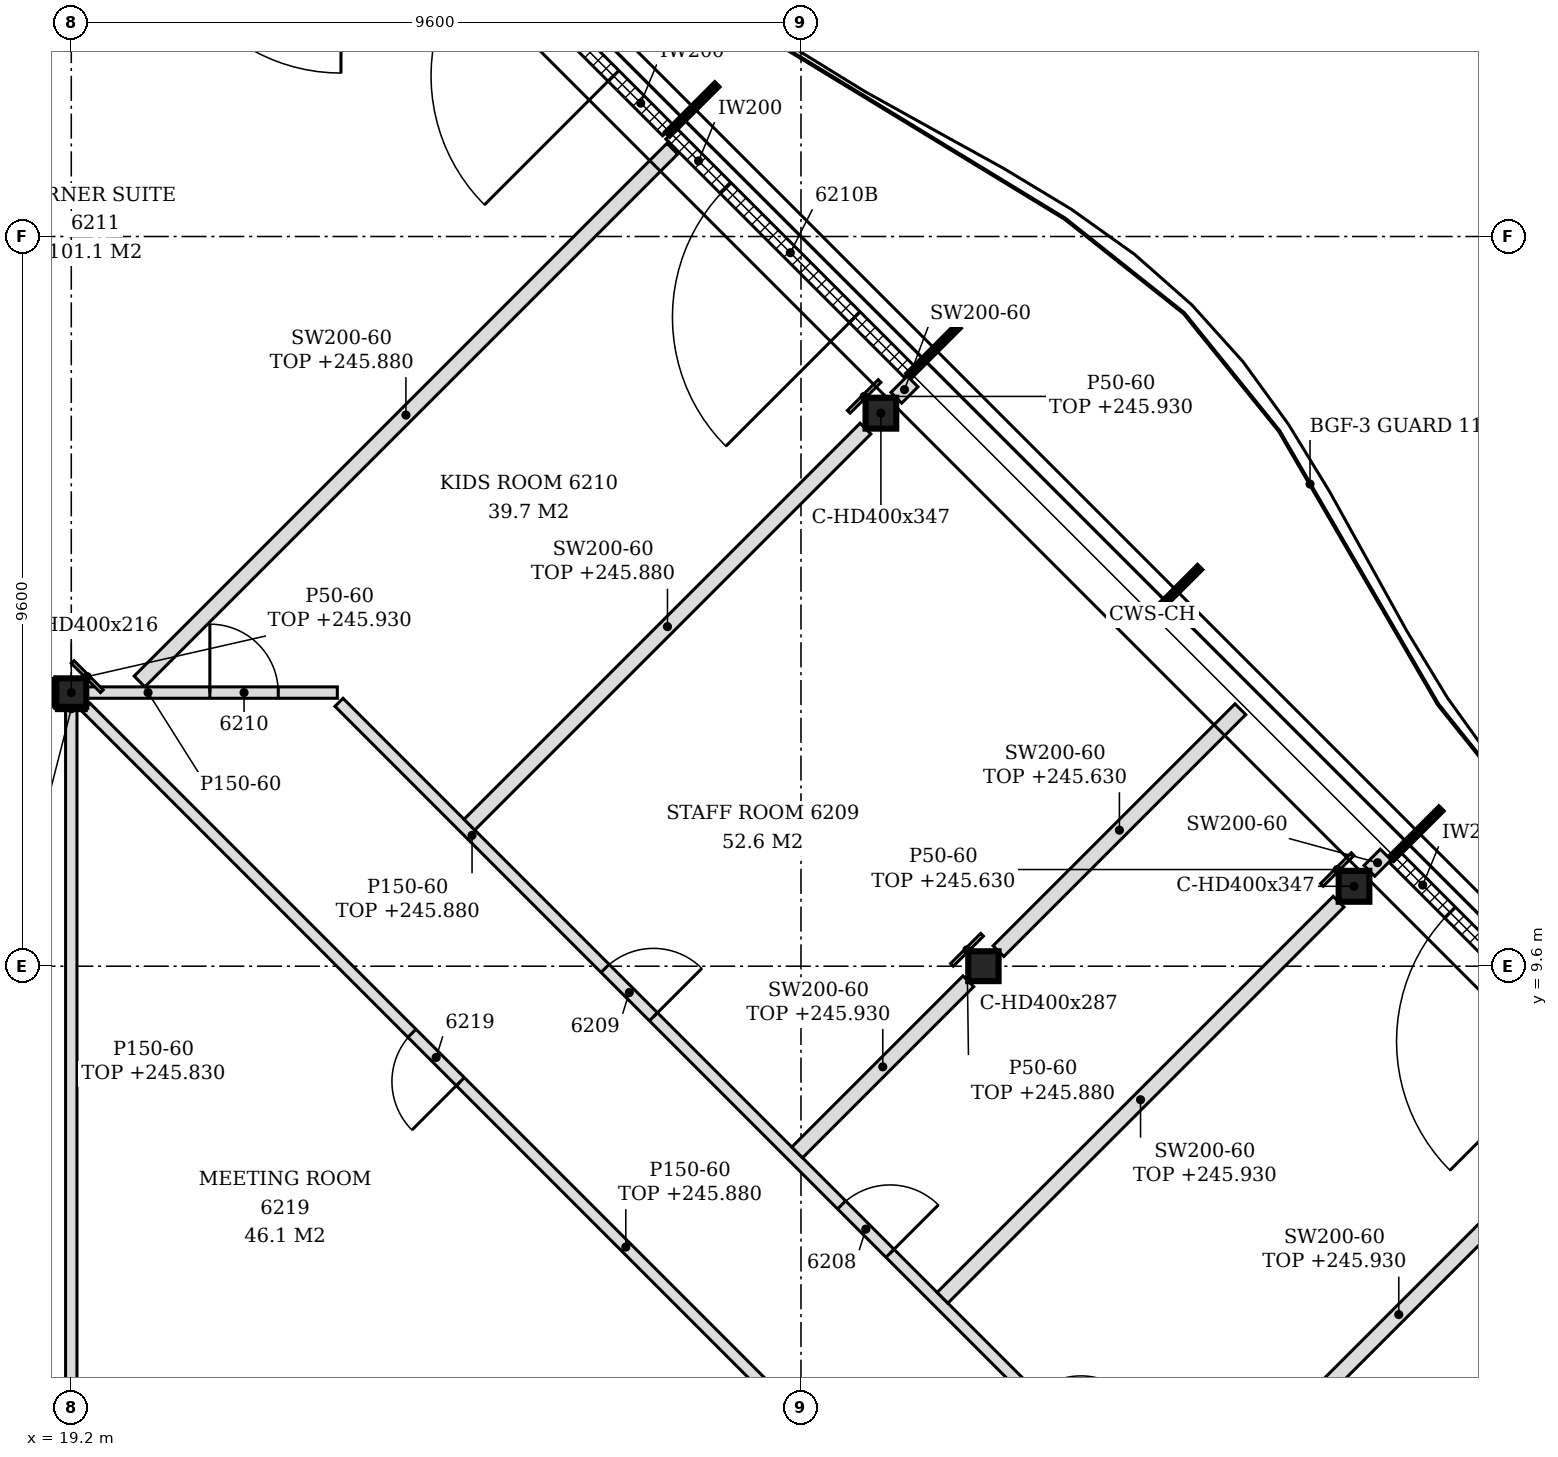
"""IFC4 building model, lengths in metres.
Left out: names, types, materials, properties, quantities, classifications, styles, units other than length and angle.
Written with IfcOpenShell. Run it as: python <this file> out.ifc"""

import sys

from ifc_helpers import new_model, si_unit, direction, frame, frame_2d, origin, origin_2d, place, context, subcontext, project, spatial, rectangle, i_section, extrude, element, fill, save


model = new_model("IFC4")
c1 = context("Model", 3, precision=1e-05, world=origin(), true_north=direction((0.0, 1.0)))
c2 = subcontext(c1, "Body", "Model", "MODEL_VIEW")
j1 = project(units=[si_unit("LENGTHUNIT", "METRE"), si_unit("PLANEANGLEUNIT", "RADIAN")], contexts=[c1])
p1 = place(None, origin())
s1 = spatial("IfcSite", under=j1, at=p1, CompositionType="ELEMENT")
p2 = place(p1, origin())
s2 = spatial("IfcBuilding", under=s1, at=p2, CompositionType="ELEMENT")
p3 = place(p2, frame((0.0, 0.0, 243.0)))
s3 = spatial("IfcBuildingStorey", under=s2, at=p3, CompositionType="ELEMENT", Elevation=243.0)
for number, where, z_axis, x_axis in (
    (1, (36.076, 10.652, -0.15), (0.0, 0.0, 1.0), (1.0, 0.0, 0.0)),
    (2, (29.852, 16.876, -0.15), (0.0, 0.0, 1.0), (1.0, 0.0, 0.0)),
):
    element("IfcColumn", number, at=place(p3, frame(where, z_axis=z_axis, x_axis=x_axis)), inside=s3, PredefinedType="COLUMN", context=c2, shape_type="SweptSolid", body=[
        extrude(i_section(OverallWidth=0.404, OverallDepth=0.407, WebThickness=0.027, FlangeThickness=0.044, FilletRadius=0.015, at=origin_2d()), origin(), (0.0, 0.0, 1.0), 3.6),
    ])
p4 = place(p3, frame((19.2, 13.2, -0.15), z_axis=(0.0, 0.0, 1.0), x_axis=(1.0, 0.0, 0.0)))
e3 = element("IfcColumn", 3, at=p4, inside=s3, PredefinedType="COLUMN", context=c2, shape_type="SweptSolid", body=[
    extrude(i_section(OverallWidth=0.394, OverallDepth=0.375, WebThickness=0.017, FlangeThickness=0.028, FilletRadius=0.015, at=origin_2d()), origin(), (0.0, 0.0, 1.0), 3.6),
])
p5 = place(p3, frame((31.2, 9.6, -0.15), z_axis=(0.0, 0.0, 1.0), x_axis=(1.0, 0.0, 0.0)))
e4 = element("IfcColumn", 4, at=p5, inside=s3, PredefinedType="COLUMN", context=c2, shape_type="SweptSolid", body=[
    extrude(i_section(OverallWidth=0.399, OverallDepth=0.393, WebThickness=0.023, FlangeThickness=0.037, FilletRadius=0.015, at=origin_2d()), origin(), (0.0, 0.0, 1.0), 3.6),
])
p6 = place(p3, frame((39.753, 7.893, 0.0), z_axis=(0.0, 0.0, 1.0), x_axis=(-0.707106781187, 0.707106781187, 0.0)))
e5 = element("IfcWall", 5, at=p6, inside=s3, PredefinedType="NOTDEFINED", context=c2, shape_type="SweptSolid", body=[
    extrude(rectangle(XDim=4.431, YDim=0.2, at=frame_2d((2.215, 0.0))), origin(), (0.0, 0.0, 1.0), 3.45),
])
p7 = place(p6, frame((1.015, 0.0, 0.0)))
e6 = element("IfcOpeningElement", 6, at=p7, cuts=e5, PredefinedType="OPENING", context=c2, shape_type="SweptSolid", body=[
    extrude(rectangle(XDim=2.4, YDim=2.4, at=frame_2d((1.2, 1.2))), frame((0.0, 0.11, 0.0), z_axis=(0.0, -1.0, 0.0), x_axis=(1.0, 0.0, 0.0)), (0.0, 0.0, 1.0), 0.22),
])
p8 = place(p3, frame((30.226, 17.42, 0.0), z_axis=(0.0, 0.0, 1.0), x_axis=(-0.707079231393, 0.707134329907, 0.0)))
e7 = element("IfcWall", 7, at=p8, inside=s3, PredefinedType="NOTDEFINED", context=c2, shape_type="SweptSolid", body=[
    extrude(rectangle(XDim=4.431, YDim=0.2, at=frame_2d((2.215, 0.0))), origin(), (0.0, 0.0, 1.0), 3.45),
])
p9 = place(p8, frame((1.015, 0.0, 0.0)))
e8 = element("IfcOpeningElement", 8, at=p9, cuts=e7, PredefinedType="OPENING", context=c2, shape_type="SweptSolid", body=[
    extrude(rectangle(XDim=2.4, YDim=2.4, at=frame_2d((1.2, 1.2))), frame((0.0, 0.11, 0.0), z_axis=(0.0, -1.0, 0.0), x_axis=(1.0, 0.0, 0.0)), (0.0, 0.0, 1.0), 0.22),
])
p10 = place(p3, frame((27.051, 20.596, 0.0), z_axis=(0.0, 0.0, 1.0), x_axis=(-0.707106781187, 0.707106781187, 0.0)))
e9 = element("IfcWall", 9, at=p10, inside=s3, PredefinedType="NOTDEFINED", context=c2, shape_type="SweptSolid", body=[
    extrude(rectangle(XDim=4.421, YDim=0.2, at=frame_2d((2.21, 0.0))), origin(), (0.0, 0.0, 1.0), 3.45),
])
p11 = place(p10, frame((1.016, 0.0, 0.0)))
e10 = element("IfcOpeningElement", 10, at=p11, cuts=e9, PredefinedType="OPENING", context=c2, shape_type="SweptSolid", body=[
    extrude(rectangle(XDim=2.4, YDim=2.4, at=frame_2d((1.2, 1.2))), frame((0.0, 0.11, 0.0), z_axis=(0.0, -1.0, 0.0), x_axis=(1.0, 0.0, 0.0)), (0.0, 0.0, 1.0), 0.22),
])
p12 = place(p3, frame((34.8, 0.994, 0.0), z_axis=(0.0, 0.0, 1.0), x_axis=(-0.707099634543, 0.707113927758, 0.0)))
e11 = element("IfcWall", 11, at=p12, inside=s3, PredefinedType="PARTITIONING", context=c2, shape_type="SweptSolid", body=[
    extrude(rectangle(XDim=17.081, YDim=0.15, at=frame_2d((8.541, 0.0))), origin(), (0.0, 0.0, 1.0), 2.88),
])
p13 = place(p12, frame((3.276, 0.0, 0.0)))
e12 = element("IfcOpeningElement", 12, at=p13, cuts=e11, PredefinedType="OPENING", context=c2, shape_type="SweptSolid", body=[
    extrude(rectangle(XDim=0.9, YDim=2.1, at=frame_2d((0.45, 1.05))), frame((0.0, 0.085, 0.0), z_axis=(0.0, -1.0, 0.0), x_axis=(1.0, 0.0, 0.0)), (0.0, 0.0, 1.0), 0.17),
])
p14 = place(p12, frame((6.829, 0.0, 0.0)))
e13 = element("IfcOpeningElement", 13, at=p14, cuts=e11, PredefinedType="OPENING", context=c2, shape_type="SweptSolid", body=[
    extrude(rectangle(XDim=0.9, YDim=2.1, at=frame_2d((0.45, 1.05))), frame((0.0, 0.085, 0.0), z_axis=(0.0, -1.0, 0.0), x_axis=(1.0, 0.0, 0.0)), (0.0, 0.0, 1.0), 0.17),
])
p15 = place(p12, frame((11.23, 0.0, 0.0)))
e14 = element("IfcOpeningElement", 14, at=p15, cuts=e11, PredefinedType="OPENING", context=c2, shape_type="SweptSolid", body=[
    extrude(rectangle(XDim=0.9, YDim=2.1, at=frame_2d((0.45, 1.05))), frame((0.0, 0.085, 0.0), z_axis=(0.0, -1.0, 0.0), x_axis=(1.0, 0.0, 0.0)), (0.0, 0.0, 1.0), 0.17),
])
p16 = place(p3, frame((33.774, 2.126, 0.0), z_axis=(0.0, 0.0, 1.0), x_axis=(0.707121711178, 0.70709185088, 0.0)))
e15 = element("IfcWall", 15, at=p16, inside=s3, PredefinedType="PARTITIONING", context=c2, shape_type="SweptSolid", body=[
    extrude(rectangle(XDim=8.176, YDim=0.2, at=frame_2d((4.088, 0.0))), origin(), (0.0, 0.0, 1.0), 2.93),
])
p17 = place(p3, frame((19.2, 3.675, 0.0), z_axis=(0.0, 0.0, 1.0), x_axis=(0.0, 1.0, 0.0)))
e16 = element("IfcWall", 16, at=p17, inside=s3, PredefinedType="PARTITIONING", context=c2, shape_type="SweptSolid", body=[
    extrude(rectangle(XDim=9.337, YDim=0.15, at=frame_2d((4.669, 0.0))), origin(), (0.0, 0.0, 1.0), 2.83),
])
p18 = place(p3, frame((28.672, 3.728, 0.0), z_axis=(0.0, 0.0, 1.0), x_axis=(-0.707106781187, 0.707106781187, 0.0)))
e17 = element("IfcWall", 17, at=p18, inside=s3, PredefinedType="PARTITIONING", context=c2, shape_type="SweptSolid", body=[
    extrude(rectangle(XDim=13.124, YDim=0.15, at=frame_2d((6.562, 0.0))), origin(), (0.0, 0.0, 1.0), 2.88),
])
p19 = place(p18, frame((6.157, 0.0, 0.0)))
e18 = element("IfcOpeningElement", 18, at=p19, cuts=e17, PredefinedType="OPENING", context=c2, shape_type="SweptSolid", body=[
    extrude(rectangle(XDim=0.9, YDim=2.1, at=frame_2d((0.45, 1.05))), frame((0.0, 0.085, 0.0), z_axis=(0.0, -1.0, 0.0), x_axis=(1.0, 0.0, 0.0)), (0.0, 0.0, 1.0), 0.17),
])
p20 = place(p3, frame((30.662, 5.238, 0.0), z_axis=(0.0, 0.0, 1.0), x_axis=(0.707106781187, 0.707106781187, 0.0)))
e19 = element("IfcWall", 19, at=p20, inside=s3, PredefinedType="PARTITIONING", context=c2, shape_type="SweptSolid", body=[
    extrude(rectangle(XDim=7.369, YDim=0.2, at=frame_2d((3.685, 0.0))), origin(), (0.0, 0.0, 1.0), 2.93),
])
p21 = place(p3, frame((28.75, 7.15, 0.0), z_axis=(0.0, 0.0, 1.0), x_axis=(0.7070684525, 0.707145107796, 0.0)))
e20 = element("IfcWall", 20, at=p21, inside=s3, PredefinedType="PARTITIONING", context=c2, shape_type="SweptSolid", body=[
    extrude(rectangle(XDim=3.185, YDim=0.2, at=frame_2d((1.592, 0.0))), origin(), (0.0, 0.0, 1.0), 2.93),
])
p22 = place(p3, frame((31.398, 9.798, 0.0), z_axis=(0.0, 0.0, 1.0), x_axis=(0.707133900936, 0.707079660397, 0.0)))
e21 = element("IfcWall", 21, at=p22, inside=s3, PredefinedType="PARTITIONING", context=c2, shape_type="SweptSolid", body=[
    extrude(rectangle(XDim=4.501, YDim=0.2, at=frame_2d((2.25, 0.0))), origin(), (0.0, 0.0, 1.0), 2.63),
])
p23 = place(p3, frame((36.278, 10.854, 0.0), z_axis=(0.0, 0.0, 1.0), x_axis=(0.707509117806, 0.706704215511, 0.0)))
e22 = element("IfcWall", 22, at=p23, inside=s3, PredefinedType="PARTITIONING", context=c2, shape_type="SweptSolid", body=[
    extrude(rectangle(XDim=0.303, YDim=0.2, at=frame_2d((0.152, 0.0))), origin(), (0.0, 0.0, 1.0), 3.45),
])
p24 = place(p3, frame((24.438, 11.462, 0.0), z_axis=(0.0, 0.0, 1.0), x_axis=(0.707090216072, 0.707123345913, 0.0)))
e23 = element("IfcWall", 23, at=p24, inside=s3, PredefinedType="PARTITIONING", context=c2, shape_type="SweptSolid", body=[
    extrude(rectangle(XDim=7.369, YDim=0.2, at=frame_2d((3.685, 0.0))), origin(), (0.0, 0.0, 1.0), 2.88),
])
p25 = place(p3, frame((7.397, 13.2, 0.0), z_axis=(0.0, 0.0, 1.0), x_axis=(1.0, 0.0, 0.0)))
e24 = element("IfcWall", 24, at=p25, inside=s3, PredefinedType="PARTITIONING", context=c2, shape_type="SweptSolid", body=[
    extrude(rectangle(XDim=11.606, YDim=0.15, at=frame_2d((5.803, 0.0))), origin(), (0.0, 0.0, 1.0), 2.83),
])
p26 = place(p25, frame((10.153, 0.0, 0.0)))
e25 = element("IfcOpeningElement", 25, at=p26, cuts=e24, PredefinedType="OPENING", context=c2, shape_type="SweptSolid", body=[
    extrude(rectangle(XDim=0.9, YDim=2.1, at=frame_2d((0.45, 1.05))), frame((0.0, 0.085, 0.0), z_axis=(0.0, -1.0, 0.0), x_axis=(1.0, 0.0, 0.0)), (0.0, 0.0, 1.0), 0.17),
])
p27 = place(p3, frame((19.397, 13.2, 0.0), z_axis=(0.0, 0.0, 1.0), x_axis=(1.0, 0.0, 0.0)))
e26 = element("IfcWall", 26, at=p27, inside=s3, PredefinedType="PARTITIONING", context=c2, shape_type="SweptSolid", body=[
    extrude(rectangle(XDim=3.303, YDim=0.15, at=frame_2d((1.652, 0.0))), origin(), (0.0, 0.0, 1.0), 3.45),
])
p28 = place(p27, frame((1.626, 0.0, 0.0)))
e27 = element("IfcOpeningElement", 27, at=p28, cuts=e26, PredefinedType="OPENING", context=c2, shape_type="SweptSolid", body=[
    extrude(rectangle(XDim=0.9, YDim=2.1, at=frame_2d((0.45, 1.05))), frame((0.0, 0.085, 0.0), z_axis=(0.0, -1.0, 0.0), x_axis=(1.0, 0.0, 0.0)), (0.0, 0.0, 1.0), 0.17),
])
p29 = place(p3, frame((20.098, 13.346, 0.0), z_axis=(0.0, 0.0, 1.0), x_axis=(0.707119095079, 0.70709446708, 0.0)))
e28 = element("IfcWall", 28, at=p29, inside=s3, PredefinedType="PARTITIONING", context=c2, shape_type="SweptSolid", body=[
    extrude(rectangle(XDim=9.913, YDim=0.2, at=frame_2d((4.957, 0.0))), origin(), (0.0, 0.0, 1.0), 2.88),
])
p30 = place(p3, frame((30.054, 17.078, 0.0), z_axis=(0.0, 0.0, 1.0), x_axis=(0.707106781187, 0.707106781187, 0.0)))
e29 = element("IfcWall", 29, at=p30, inside=s3, PredefinedType="PARTITIONING", context=c2, shape_type="SweptSolid", body=[
    extrude(rectangle(XDim=0.303, YDim=0.2, at=frame_2d((0.152, 0.0))), origin(), (0.0, 0.0, 1.0), 3.45),
])
p31 = place(p3, frame((18.978, 13.012, 0.0), z_axis=(0.0, 0.0, 1.0), x_axis=(0.0, 1.0, 0.0)))
e30 = element("IfcWall", 30, at=p31, inside=s3, PredefinedType="PARTITIONING", context=c2, shape_type="SweptSolid", body=[
    extrude(rectangle(XDim=0.375, YDim=0.05, at=frame_2d((0.188, 0.0))), origin(), (0.0, 0.0, 1.0), 2.83),
])
p32 = place(p3, frame((19.602, 13.218, 0.0), z_axis=(0.0, 0.0, 1.0), x_axis=(-0.707106781187, 0.707106781187, 0.0)))
e31 = element("IfcWall", 31, at=p32, inside=s3, PredefinedType="PARTITIONING", context=c2, shape_type="SweptSolid", body=[
    extrude(rectangle(XDim=0.544, YDim=0.05, at=frame_2d((0.272, 0.0))), origin(), (0.0, 0.0, 1.0), 2.93),
])
p33 = place(p3, frame((35.653, 10.669, 0.0), z_axis=(0.0, 0.0, 1.0), x_axis=(0.707106781187, 0.707106781187, 0.0)))
e32 = element("IfcWall", 32, at=p33, inside=s3, PredefinedType="PARTITIONING", context=c2, shape_type="SweptSolid", body=[
    extrude(rectangle(XDim=0.573, YDim=0.05, at=frame_2d((0.287, 0.0))), origin(), (0.0, 0.0, 1.0), 2.63),
])
p34 = place(p3, frame((30.786, 9.618, 0.0), z_axis=(0.0, 0.0, 1.0), x_axis=(0.707106781187, 0.707106781187, 0.0)))
e33 = element("IfcWall", 33, at=p34, inside=s3, PredefinedType="PARTITIONING", context=c2, shape_type="SweptSolid", body=[
    extrude(rectangle(XDim=0.56, YDim=0.05, at=frame_2d((0.28, 0.0))), origin(), (0.0, 0.0, 1.0), 2.88),
])
p35 = place(p3, frame((29.428, 16.893, 0.0), z_axis=(0.0, 0.0, 1.0), x_axis=(0.707106781187, 0.707106781187, 0.0)))
e34 = element("IfcWall", 34, at=p35, inside=s3, PredefinedType="PARTITIONING", context=c2, shape_type="SweptSolid", body=[
    extrude(rectangle(XDim=0.573, YDim=0.05, at=frame_2d((0.287, 0.0))), origin(), (0.0, 0.0, 1.0), 2.93),
])
p36 = place(p3, frame((19.003, 12.988, 0.0), z_axis=(0.0, 0.0, 1.0), x_axis=(1.0, 0.0, 0.0)))
e35 = element("IfcWall", 35, at=p36, inside=s3, PredefinedType="PARTITIONING", context=c2, shape_type="SweptSolid", body=[
    extrude(rectangle(XDim=0.394, YDim=0.05, at=frame_2d((0.197, 0.0))), origin(), (0.0, 0.0, 1.0), 2.83),
])
p37 = place(p7, origin())
e36 = element("IfcDoor", 36, at=p37, inside=s3, OperationType="SINGLE_SWING_LEFT", PredefinedType="DOOR", context=c2, shape_type="SweptSolid", body=[
    extrude(rectangle(XDim=2.4, YDim=2.4, at=frame_2d((1.2, 1.2))), frame((0.0, 0.025, 0.0), z_axis=(0.0, -1.0, 0.0), x_axis=(1.0, 0.0, 0.0)), (0.0, 0.0, 1.0), 0.05),
])
fill(e6, e36)
p38 = place(p9, origin())
e37 = element("IfcDoor", 37, at=p38, inside=s3, OperationType="SINGLE_SWING_LEFT", PredefinedType="DOOR", context=c2, shape_type="SweptSolid", body=[
    extrude(rectangle(XDim=2.4, YDim=2.4, at=frame_2d((1.2, 1.2))), frame((0.0, 0.025, 0.0), z_axis=(0.0, -1.0, 0.0), x_axis=(1.0, 0.0, 0.0)), (0.0, 0.0, 1.0), 0.05),
])
fill(e8, e37)
p39 = place(p11, origin())
e38 = element("IfcDoor", 38, at=p39, inside=s3, OperationType="SINGLE_SWING_LEFT", PredefinedType="DOOR", context=c2, shape_type="SweptSolid", body=[
    extrude(rectangle(XDim=2.4, YDim=2.4, at=frame_2d((1.2, 1.2))), frame((0.0, 0.025, 0.0), z_axis=(0.0, -1.0, 0.0), x_axis=(1.0, 0.0, 0.0)), (0.0, 0.0, 1.0), 0.05),
])
fill(e10, e38)
p40 = place(p14, frame((0.9, 0.0, 0.0), z_axis=(0.0, 0.0, 1.0), x_axis=(-1.0, 0.0, 0.0)))
e39 = element("IfcDoor", 39, at=p40, inside=s3, OperationType="SINGLE_SWING_RIGHT", PredefinedType="DOOR", context=c2, shape_type="SweptSolid", body=[
    extrude(rectangle(XDim=0.9, YDim=2.1, at=frame_2d((0.45, 1.05))), frame((0.0, 0.025, 0.0), z_axis=(0.0, -1.0, 0.0), x_axis=(1.0, 0.0, 0.0)), (0.0, 0.0, 1.0), 0.05),
])
fill(e13, e39)
p41 = place(p15, frame((0.9, 0.0, 0.0), z_axis=(0.0, 0.0, 1.0), x_axis=(-1.0, 0.0, 0.0)))
e40 = element("IfcDoor", 40, at=p41, inside=s3, OperationType="SINGLE_SWING_RIGHT", PredefinedType="DOOR", context=c2, shape_type="SweptSolid", body=[
    extrude(rectangle(XDim=0.9, YDim=2.1, at=frame_2d((0.45, 1.05))), frame((0.0, 0.025, 0.0), z_axis=(0.0, -1.0, 0.0), x_axis=(1.0, 0.0, 0.0)), (0.0, 0.0, 1.0), 0.05),
])
fill(e14, e40)
p42 = place(p28, origin())
e41 = element("IfcDoor", 41, at=p42, inside=s3, OperationType="SINGLE_SWING_LEFT", PredefinedType="DOOR", context=c2, shape_type="SweptSolid", body=[
    extrude(rectangle(XDim=0.9, YDim=2.1, at=frame_2d((0.45, 1.05))), frame((0.0, 0.025, 0.0), z_axis=(0.0, -1.0, 0.0), x_axis=(1.0, 0.0, 0.0)), (0.0, 0.0, 1.0), 0.05),
])
fill(e27, e41)
p43 = place(p19, origin())
e42 = element("IfcDoor", 42, at=p43, inside=s3, OperationType="SINGLE_SWING_LEFT", PredefinedType="DOOR", context=c2, shape_type="SweptSolid", body=[
    extrude(rectangle(XDim=0.9, YDim=2.1, at=frame_2d((0.45, 1.05))), frame((0.0, 0.025, 0.0), z_axis=(0.0, -1.0, 0.0), x_axis=(1.0, 0.0, 0.0)), (0.0, 0.0, 1.0), 0.05),
])
fill(e18, e42)
save(model, sys.argv[1])
